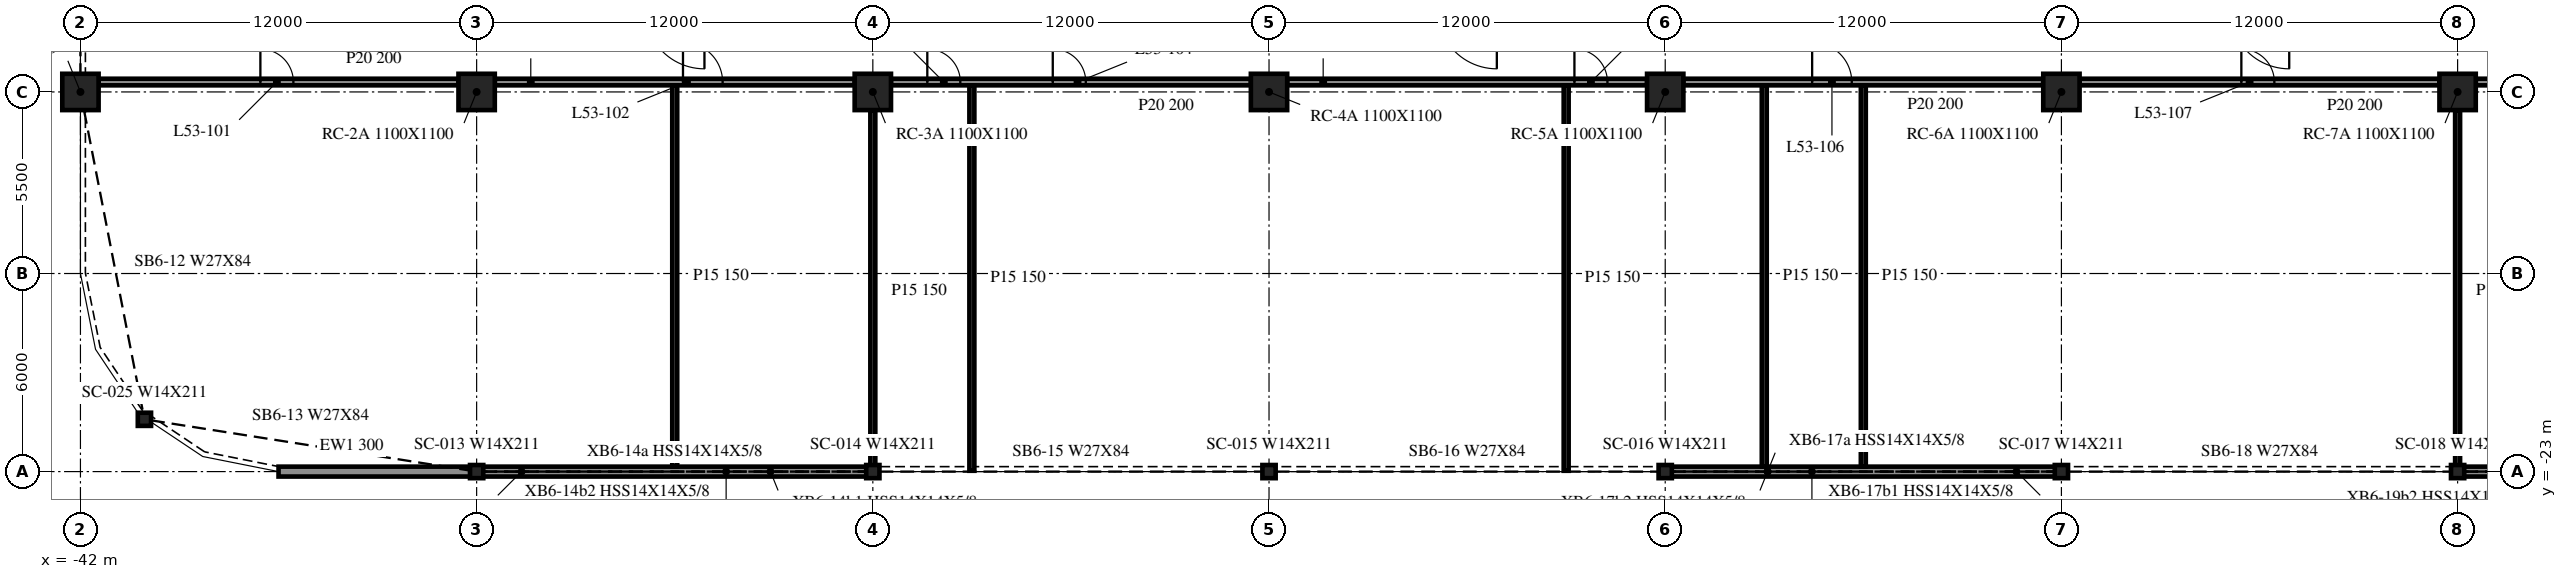
"""IFC4 building model, lengths in metres.
Left out: names, types, materials, properties, quantities, classifications, styles, units other than length and angle.
Written with IfcOpenShell. Run it as: python <this file> out.ifc"""

import sys

from ifc_helpers import new_model, si_unit, direction, frame, frame_2d, origin, origin_2d, place, context, subcontext, project, spatial, rectangle, i_section, extrude, element, fill, save


model = new_model("IFC4")
c1 = context("Model", 3, precision=1e-05, world=origin(), true_north=direction((0.0, 1.0)))
c2 = subcontext(c1, "Body", "Model", "MODEL_VIEW")
j1 = project(units=[si_unit("LENGTHUNIT", "METRE"), si_unit("PLANEANGLEUNIT", "RADIAN")], contexts=[c1])
p1 = place(None, origin())
s1 = spatial("IfcSite", under=j1, at=p1, CompositionType="ELEMENT")
p2 = place(p1, origin())
s2 = spatial("IfcBuilding", under=s1, at=p2, CompositionType="ELEMENT")
p3 = place(p2, frame((0.0, 0.0, 220.5)))
s3 = spatial("IfcBuildingStorey", under=s2, at=p3, CompositionType="ELEMENT", Elevation=220.5)
for number, where, z_axis, x_axis in (
    (1, (-42.0, -11.5, -0.34), (0.0, 0.0, 1.0), (1.0, 0.0, 0.0)),
    (2, (-30.0, -11.5, -0.34), (0.0, 0.0, 1.0), (1.0, 0.0, 0.0)),
    (3, (-18.0, -11.5, -0.34), (0.0, 0.0, 1.0), (1.0, 0.0, 0.0)),
    (4, (-6.0, -11.5, -0.34), (0.0, 0.0, 1.0), (1.0, 0.0, 0.0)),
    (5, (6.0, -11.5, -0.34), (0.0, 0.0, 1.0), (1.0, 0.0, 0.0)),
    (6, (18.0, -11.5, -0.34), (0.0, 0.0, 1.0), (1.0, 0.0, 0.0)),
    (7, (30.0, -11.5, -0.34), (0.0, 0.0, 1.0), (1.0, 0.0, 0.0)),
):
    element("IfcColumn", number, at=place(p3, frame(where, z_axis=z_axis, x_axis=x_axis)), inside=s3, PredefinedType="COLUMN", context=c2, shape_type="SweptSolid", body=[
        extrude(rectangle(XDim=1.1, YDim=1.1, at=origin_2d()), origin(), (0.0, 0.0, 1.0), 3.74),
    ])
for number, where, z_axis, x_axis in (
    (8, (-40.062, -21.416, -0.34), (0.0, 0.0, 1.0), (1.0, 0.0, 0.0)),
    (9, (-30.0, -23.0, -0.34), (0.0, 0.0, 1.0), (1.0, 0.0, 0.0)),
    (10, (-18.0, -23.0, -0.34), (0.0, 0.0, 1.0), (1.0, 0.0, 0.0)),
    (11, (-6.0, -23.0, -0.34), (0.0, 0.0, 1.0), (1.0, 0.0, 0.0)),
    (12, (6.0, -23.0, -0.34), (0.0, 0.0, 1.0), (1.0, 0.0, 0.0)),
    (13, (18.0, -23.0, -0.34), (0.0, 0.0, 1.0), (1.0, 0.0, 0.0)),
    (14, (30.0, -23.0, -0.34), (0.0, 0.0, 1.0), (1.0, 0.0, 0.0)),
):
    element("IfcColumn", number, at=place(p3, frame(where, z_axis=z_axis, x_axis=x_axis)), inside=s3, PredefinedType="COLUMN", context=c2, shape_type="SweptSolid", body=[
        extrude(i_section(OverallWidth=0.401, OverallDepth=0.399, WebThickness=0.025, FlangeThickness=0.04, at=origin_2d()), origin(), (0.0, 0.0, 1.0), 3.74),
    ])
p4 = place(p3, frame((-36.0, -23.0, 0.0), z_axis=(0.0, 0.0, 1.0), x_axis=(1.0, 0.0, 0.0)))
e15 = element("IfcWall", 15, at=p4, inside=s3, PredefinedType="NOTDEFINED", context=c2, shape_type="SweptSolid", body=[
    extrude(rectangle(XDim=5.988, YDim=0.3, at=frame_2d((2.994, 0.0))), origin(), (0.0, 0.0, 1.0), 3.4),
])
for number, where, z_axis, x_axis in (
    (16, (-29.988, -23.0, 0.0), (0.0, 0.0, 1.0), (1.0, 0.0, 0.0)),
    (17, (6.012, -23.0, 0.0), (0.0, 0.0, 1.0), (1.0, 0.0, 0.0)),
    (18, (30.012, -23.0, 0.0), (0.0, 0.0, 1.0), (1.0, 0.0, 0.0)),
):
    element("IfcWall", number, at=place(p3, frame(where, z_axis=z_axis, x_axis=x_axis)), inside=s3, PredefinedType="NOTDEFINED", context=c2, shape_type="SweptSolid", body=[
        extrude(rectangle(XDim=11.975, YDim=0.3, at=frame_2d((5.988, 0.0))), origin(), (0.0, 0.0, 1.0), 3.4),
    ])
p5 = place(p3, frame((-41.45, -11.2, 0.0), z_axis=(0.0, 0.0, 1.0), x_axis=(1.0, 0.0, 0.0)))
e19 = element("IfcWall", 19, at=p5, inside=s3, PredefinedType="PARTITIONING", context=c2, shape_type="SweptSolid", body=[
    extrude(rectangle(XDim=10.9, YDim=0.2, at=frame_2d((5.45, 0.0))), origin(), (0.0, 0.0, 1.0), 3.4),
])
p6 = place(p5, frame((4.9, 0.0, 0.0)))
e20 = element("IfcOpeningElement", 20, at=p6, cuts=e19, PredefinedType="OPENING", context=c2, shape_type="SweptSolid", body=[
    extrude(rectangle(XDim=1.0, YDim=2.1, at=frame_2d((0.5, 1.05))), frame((0.0, 0.11, 0.0), z_axis=(0.0, -1.0, 0.0), x_axis=(1.0, 0.0, 0.0)), (0.0, 0.0, 1.0), 0.22),
])
p7 = place(p3, frame((-29.45, -11.2, 0.0), z_axis=(0.0, 0.0, 1.0), x_axis=(1.0, 0.0, 0.0)))
e21 = element("IfcWall", 21, at=p7, inside=s3, PredefinedType="PARTITIONING", context=c2, shape_type="SweptSolid", body=[
    extrude(rectangle(XDim=10.9, YDim=0.2, at=frame_2d((5.45, 0.0))), origin(), (0.0, 0.0, 1.0), 3.4),
])
p8 = place(p7, frame((5.7, 0.0, 0.0)))
e22 = element("IfcOpeningElement", 22, at=p8, cuts=e21, PredefinedType="OPENING", context=c2, shape_type="SweptSolid", body=[
    extrude(rectangle(XDim=1.2, YDim=2.1, at=frame_2d((0.6, 1.05))), frame((0.0, 0.11, 0.0), z_axis=(0.0, -1.0, 0.0), x_axis=(1.0, 0.0, 0.0)), (0.0, 0.0, 1.0), 0.22),
])
p9 = place(p3, frame((-17.45, -11.2, 0.0), z_axis=(0.0, 0.0, 1.0), x_axis=(1.0, 0.0, 0.0)))
e23 = element("IfcWall", 23, at=p9, inside=s3, PredefinedType="PARTITIONING", context=c2, shape_type="SweptSolid", body=[
    extrude(rectangle(XDim=10.9, YDim=0.2, at=frame_2d((5.45, 0.0))), origin(), (0.0, 0.0, 1.0), 3.4),
])
p10 = place(p9, frame((1.1, 0.0, 0.0)))
e24 = element("IfcOpeningElement", 24, at=p10, cuts=e23, PredefinedType="OPENING", context=c2, shape_type="SweptSolid", body=[
    extrude(rectangle(XDim=1.0, YDim=2.1, at=frame_2d((0.5, 1.05))), frame((0.0, 0.11, 0.0), z_axis=(0.0, -1.0, 0.0), x_axis=(1.0, 0.0, 0.0)), (0.0, 0.0, 1.0), 0.22),
])
p11 = place(p9, frame((4.9, 0.0, 0.0)))
e25 = element("IfcOpeningElement", 25, at=p11, cuts=e23, PredefinedType="OPENING", context=c2, shape_type="SweptSolid", body=[
    extrude(rectangle(XDim=1.0, YDim=2.1, at=frame_2d((0.5, 1.05))), frame((0.0, 0.11, 0.0), z_axis=(0.0, -1.0, 0.0), x_axis=(1.0, 0.0, 0.0)), (0.0, 0.0, 1.0), 0.22),
])
p12 = place(p3, frame((-5.45, -11.2, 0.0), z_axis=(0.0, 0.0, 1.0), x_axis=(1.0, 0.0, 0.0)))
e26 = element("IfcWall", 26, at=p12, inside=s3, PredefinedType="PARTITIONING", context=c2, shape_type="SweptSolid", body=[
    extrude(rectangle(XDim=10.9, YDim=0.2, at=frame_2d((5.45, 0.0))), origin(), (0.0, 0.0, 1.0), 3.4),
])
p13 = place(p12, frame((8.7, 0.0, 0.0)))
e27 = element("IfcOpeningElement", 27, at=p13, cuts=e26, PredefinedType="OPENING", context=c2, shape_type="SweptSolid", body=[
    extrude(rectangle(XDim=1.0, YDim=2.1, at=frame_2d((0.5, 1.05))), frame((0.0, 0.11, 0.0), z_axis=(0.0, -1.0, 0.0), x_axis=(1.0, 0.0, 0.0)), (0.0, 0.0, 1.0), 0.22),
])
p14 = place(p3, frame((6.55, -11.2, 0.0), z_axis=(0.0, 0.0, 1.0), x_axis=(1.0, 0.0, 0.0)))
e28 = element("IfcWall", 28, at=p14, inside=s3, PredefinedType="PARTITIONING", context=c2, shape_type="SweptSolid", body=[
    extrude(rectangle(XDim=10.9, YDim=0.2, at=frame_2d((5.45, 0.0))), origin(), (0.0, 0.0, 1.0), 3.4),
])
p15 = place(p14, frame((3.9, 0.0, 0.0)))
e29 = element("IfcOpeningElement", 29, at=p15, cuts=e28, PredefinedType="OPENING", context=c2, shape_type="SweptSolid", body=[
    extrude(rectangle(XDim=1.2, YDim=2.1, at=frame_2d((0.6, 1.05))), frame((0.0, 0.11, 0.0), z_axis=(0.0, -1.0, 0.0), x_axis=(1.0, 0.0, 0.0)), (0.0, 0.0, 1.0), 0.22),
])
p16 = place(p3, frame((18.55, -11.2, 0.0), z_axis=(0.0, 0.0, 1.0), x_axis=(1.0, 0.0, 0.0)))
e30 = element("IfcWall", 30, at=p16, inside=s3, PredefinedType="PARTITIONING", context=c2, shape_type="SweptSolid", body=[
    extrude(rectangle(XDim=10.9, YDim=0.2, at=frame_2d((5.45, 0.0))), origin(), (0.0, 0.0, 1.0), 3.4),
])
p17 = place(p16, frame((4.9, 0.0, 0.0)))
e31 = element("IfcOpeningElement", 31, at=p17, cuts=e30, PredefinedType="OPENING", context=c2, shape_type="SweptSolid", body=[
    extrude(rectangle(XDim=1.0, YDim=2.1, at=frame_2d((0.5, 1.05))), frame((0.0, 0.11, 0.0), z_axis=(0.0, -1.0, 0.0), x_axis=(1.0, 0.0, 0.0)), (0.0, 0.0, 1.0), 0.22),
])
p18 = place(p3, frame((30.55, -11.2, 0.0), z_axis=(0.0, 0.0, 1.0), x_axis=(1.0, 0.0, 0.0)))
e32 = element("IfcWall", 32, at=p18, inside=s3, PredefinedType="PARTITIONING", context=c2, shape_type="SweptSolid", body=[
    extrude(rectangle(XDim=10.9, YDim=0.2, at=frame_2d((5.45, 0.0))), origin(), (0.0, 0.0, 1.0), 3.4),
])
p19 = place(p18, frame((3.9, 0.0, 0.0)))
e33 = element("IfcOpeningElement", 33, at=p19, cuts=e32, PredefinedType="OPENING", context=c2, shape_type="SweptSolid", body=[
    extrude(rectangle(XDim=1.2, YDim=2.1, at=frame_2d((0.6, 1.05))), frame((0.0, 0.11, 0.0), z_axis=(0.0, -1.0, 0.0), x_axis=(1.0, 0.0, 0.0)), (0.0, 0.0, 1.0), 0.22),
])
p20 = place(p18, frame((5.7, 0.0, 0.0)))
e34 = element("IfcOpeningElement", 34, at=p20, cuts=e32, PredefinedType="OPENING", context=c2, shape_type="SweptSolid", body=[
    extrude(rectangle(XDim=1.0, YDim=2.1, at=frame_2d((0.5, 1.05))), frame((0.0, 0.11, 0.0), z_axis=(0.0, -1.0, 0.0), x_axis=(1.0, 0.0, 0.0)), (0.0, 0.0, 1.0), 0.22),
])
p21 = place(p3, frame((-24.0, -22.85, 0.0), z_axis=(0.0, 0.0, 1.0), x_axis=(0.0, 1.0, 0.0)))
e35 = element("IfcWall", 35, at=p21, inside=s3, PredefinedType="PARTITIONING", context=c2, shape_type="SweptSolid", body=[
    extrude(rectangle(XDim=11.55, YDim=0.15, at=frame_2d((5.775, 0.0))), origin(), (0.0, 0.0, 1.0), 3.4),
])
p22 = place(p3, frame((-18.0, -22.975, 0.0), z_axis=(0.0, 0.0, 1.0), x_axis=(0.0, 1.0, 0.0)))
e36 = element("IfcWall", 36, at=p22, inside=s3, PredefinedType="PARTITIONING", context=c2, shape_type="SweptSolid", body=[
    extrude(rectangle(XDim=10.925, YDim=0.15, at=frame_2d((5.462, 0.0))), origin(), (0.0, 0.0, 1.0), 2.401),
])
for number, where, z_axis, x_axis in (
    (37, (-15.0, -22.975, 0.0), (0.0, 0.0, 1.0), (0.0, 1.0, 0.0)),
    (38, (3.0, -22.975, 0.0), (0.0, 0.0, 1.0), (0.0, 1.0, 0.0)),
):
    element("IfcWall", number, at=place(p3, frame(where, z_axis=z_axis, x_axis=x_axis)), inside=s3, PredefinedType="PARTITIONING", context=c2, shape_type="SweptSolid", body=[
        extrude(rectangle(XDim=11.675, YDim=0.15, at=frame_2d((5.837, 0.0))), origin(), (0.0, 0.0, 1.0), 3.4),
    ])
for number, where, z_axis, x_axis in (
    (39, (9.0, -22.85, 0.0), (0.0, 0.0, 1.0), (0.0, 1.0, 0.0)),
    (40, (12.0, -22.85, 0.0), (0.0, 0.0, 1.0), (0.0, 1.0, 0.0)),
):
    element("IfcWall", number, at=place(p3, frame(where, z_axis=z_axis, x_axis=x_axis)), inside=s3, PredefinedType="PARTITIONING", context=c2, shape_type="SweptSolid", body=[
        extrude(rectangle(XDim=11.55, YDim=0.15, at=frame_2d((5.775, 0.0))), origin(), (0.0, 0.0, 1.0), 3.4),
    ])
p23 = place(p3, frame((30.0, -22.975, 0.0), z_axis=(0.0, 0.0, 1.0), x_axis=(0.0, 1.0, 0.0)))
e41 = element("IfcWall", 41, at=p23, inside=s3, PredefinedType="PARTITIONING", context=c2, shape_type="SweptSolid", body=[
    extrude(rectangle(XDim=10.925, YDim=0.15, at=frame_2d((5.462, 0.0))), origin(), (0.0, 0.0, 1.0), 2.401),
])
p24 = place(p6, origin())
e42 = element("IfcDoor", 42, at=p24, inside=s3, OperationType="SINGLE_SWING_RIGHT", PredefinedType="DOOR", context=c2, shape_type="SweptSolid", body=[
    extrude(rectangle(XDim=1.0, YDim=2.1, at=frame_2d((0.5, 1.05))), frame((0.0, 0.025, 0.0), z_axis=(0.0, -1.0, 0.0), x_axis=(1.0, 0.0, 0.0)), (0.0, 0.0, 1.0), 0.05),
])
fill(e20, e42)
p25 = place(p8, origin())
e43 = element("IfcDoor", 43, at=p25, inside=s3, OperationType="SINGLE_SWING_LEFT", PredefinedType="DOOR", context=c2, shape_type="SweptSolid", body=[
    extrude(rectangle(XDim=1.2, YDim=2.1, at=frame_2d((0.6, 1.05))), frame((0.0, 0.025, 0.0), z_axis=(0.0, -1.0, 0.0), x_axis=(1.0, 0.0, 0.0)), (0.0, 0.0, 1.0), 0.05),
])
fill(e22, e43)
p26 = place(p10, origin())
e44 = element("IfcDoor", 44, at=p26, inside=s3, OperationType="SINGLE_SWING_RIGHT", PredefinedType="DOOR", context=c2, shape_type="SweptSolid", body=[
    extrude(rectangle(XDim=1.0, YDim=2.1, at=frame_2d((0.5, 1.05))), frame((0.0, 0.025, 0.0), z_axis=(0.0, -1.0, 0.0), x_axis=(1.0, 0.0, 0.0)), (0.0, 0.0, 1.0), 0.05),
])
fill(e24, e44)
p27 = place(p11, origin())
e45 = element("IfcDoor", 45, at=p27, inside=s3, OperationType="SINGLE_SWING_RIGHT", PredefinedType="DOOR", context=c2, shape_type="SweptSolid", body=[
    extrude(rectangle(XDim=1.0, YDim=2.1, at=frame_2d((0.5, 1.05))), frame((0.0, 0.025, 0.0), z_axis=(0.0, -1.0, 0.0), x_axis=(1.0, 0.0, 0.0)), (0.0, 0.0, 1.0), 0.05),
])
fill(e25, e45)
p28 = place(p13, origin())
e46 = element("IfcDoor", 46, at=p28, inside=s3, OperationType="SINGLE_SWING_LEFT", PredefinedType="DOOR", context=c2, shape_type="SweptSolid", body=[
    extrude(rectangle(XDim=1.0, YDim=2.1, at=frame_2d((0.5, 1.05))), frame((0.0, 0.025, 0.0), z_axis=(0.0, -1.0, 0.0), x_axis=(1.0, 0.0, 0.0)), (0.0, 0.0, 1.0), 0.05),
])
fill(e27, e46)
p29 = place(p15, origin())
e47 = element("IfcDoor", 47, at=p29, inside=s3, OperationType="SINGLE_SWING_RIGHT", PredefinedType="DOOR", context=c2, shape_type="SweptSolid", body=[
    extrude(rectangle(XDim=1.2, YDim=2.1, at=frame_2d((0.6, 1.05))), frame((0.0, 0.025, 0.0), z_axis=(0.0, -1.0, 0.0), x_axis=(1.0, 0.0, 0.0)), (0.0, 0.0, 1.0), 0.05),
])
fill(e29, e47)
p30 = place(p17, origin())
e48 = element("IfcDoor", 48, at=p30, inside=s3, OperationType="SINGLE_SWING_RIGHT", PredefinedType="DOOR", context=c2, shape_type="SweptSolid", body=[
    extrude(rectangle(XDim=1.0, YDim=2.1, at=frame_2d((0.5, 1.05))), frame((0.0, 0.025, 0.0), z_axis=(0.0, -1.0, 0.0), x_axis=(1.0, 0.0, 0.0)), (0.0, 0.0, 1.0), 0.05),
])
fill(e31, e48)
save(model, sys.argv[1])
